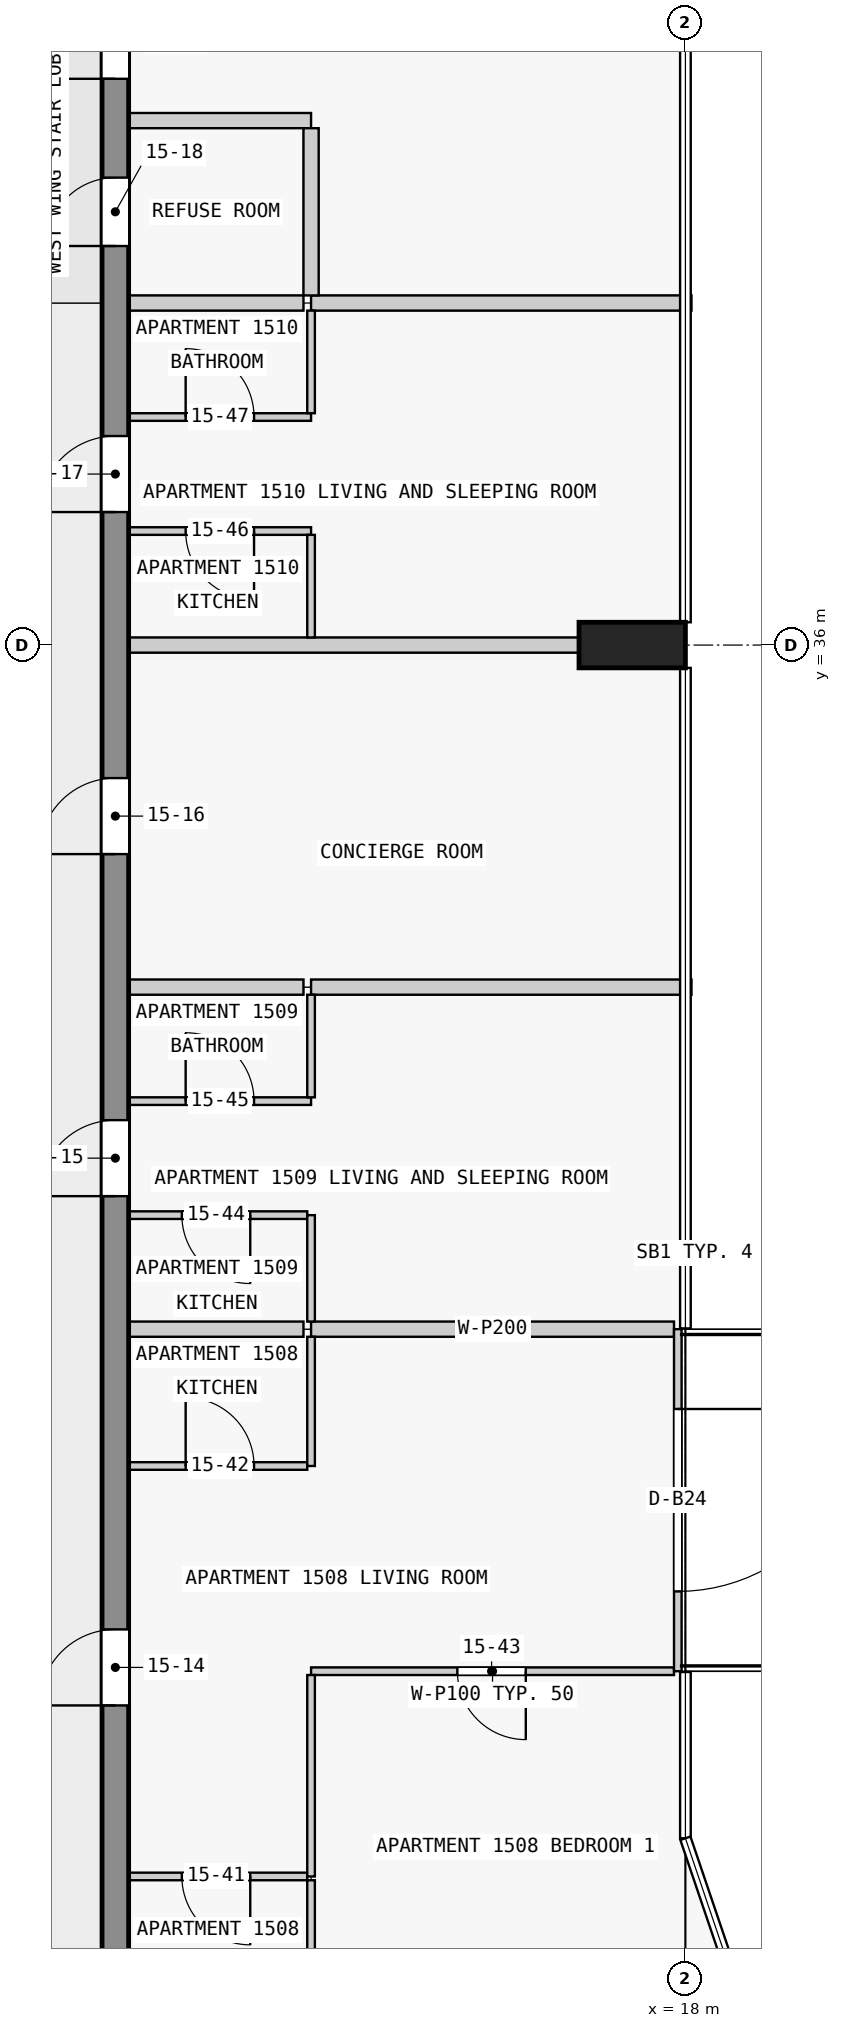
"""IFC4 building model, lengths in metres.
Left out: names, types, materials, properties, quantities, classifications, styles, units other than length and angle.
Written with IfcOpenShell. Run it as: python <this file> out.ifc"""

import sys

from ifc_helpers import new_model, si_unit, direction, frame, frame_2d, origin, origin_2d, place, context, subcontext, project, spatial, rectangle, extrude, element, fill, save


model = new_model("IFC4")
c1 = context("Model", 3, precision=1e-05, world=origin(), true_north=direction((0.0, 1.0)))
c2 = subcontext(c1, "Body", "Model", "MODEL_VIEW")
j1 = project(units=[si_unit("LENGTHUNIT", "METRE"), si_unit("PLANEANGLEUNIT", "RADIAN")], contexts=[c1])
p1 = place(None, origin())
s1 = spatial("IfcSite", under=j1, at=p1, CompositionType="ELEMENT")
p2 = place(p1, origin())
s2 = spatial("IfcBuilding", under=s1, at=p2, CompositionType="ELEMENT")
p3 = place(p2, frame((0.0, 0.0, 61.8)))
s3 = spatial("IfcBuildingStorey", under=s2, at=p3, CompositionType="ELEMENT", Elevation=61.8)
p4 = place(p3, frame((17.3, 36.0, 0.0), z_axis=(0.0, 0.0, 1.0), x_axis=(0.0, 1.0, 0.0)))
e1 = element("IfcColumn", 1, at=p4, inside=s3, PredefinedType="COLUMN", context=c2, shape_type="SweptSolid", body=[
    extrude(rectangle(XDim=0.6, YDim=1.4, at=origin_2d()), origin(), (0.0, 0.0, 1.0), 3.5),
])
p5 = place(p3, frame((10.5, 18.0, 0.0), z_axis=(0.0, 0.0, 1.0), x_axis=(0.0, 1.0, 0.0)))
e2 = element("IfcWall", 2, at=p5, inside=s3, PredefinedType="SHEAR", context=c2, shape_type="SweptSolid", body=[
    extrude(rectangle(XDim=27.0, YDim=0.35, at=frame_2d((13.5, 0.0))), origin(), (0.0, 0.0, 1.0), 3.25),
])
p6 = place(p5, frame((4.05, 0.0, 0.0)))
e3 = element("IfcOpeningElement", 3, at=p6, cuts=e2, PredefinedType="OPENING", context=c2, shape_type="SweptSolid", body=[
    extrude(rectangle(XDim=1.0, YDim=2.1, at=frame_2d((0.5, 1.05))), frame((0.0, 0.185, 0.0), z_axis=(0.0, -1.0, 0.0), x_axis=(1.0, 0.0, 0.0)), (0.0, 0.0, 1.0), 0.37),
])
p7 = place(p5, frame((10.75, 0.0, 0.0)))
e4 = element("IfcOpeningElement", 4, at=p7, cuts=e2, PredefinedType="OPENING", context=c2, shape_type="SweptSolid", body=[
    extrude(rectangle(XDim=1.0, YDim=2.1, at=frame_2d((0.5, 1.05))), frame((0.0, 0.185, 0.0), z_axis=(0.0, -1.0, 0.0), x_axis=(1.0, 0.0, 0.0)), (0.0, 0.0, 1.0), 0.37),
])
p8 = place(p5, frame((15.25, 0.0, 0.0)))
e5 = element("IfcOpeningElement", 5, at=p8, cuts=e2, PredefinedType="OPENING", context=c2, shape_type="SweptSolid", body=[
    extrude(rectangle(XDim=1.0, YDim=2.1, at=frame_2d((0.5, 1.05))), frame((0.0, 0.185, 0.0), z_axis=(0.0, -1.0, 0.0), x_axis=(1.0, 0.0, 0.0)), (0.0, 0.0, 1.0), 0.37),
])
p9 = place(p5, frame((19.75, 0.0, 0.0)))
e6 = element("IfcOpeningElement", 6, at=p9, cuts=e2, PredefinedType="OPENING", context=c2, shape_type="SweptSolid", body=[
    extrude(rectangle(XDim=1.0, YDim=2.1, at=frame_2d((0.5, 1.05))), frame((0.0, 0.185, 0.0), z_axis=(0.0, -1.0, 0.0), x_axis=(1.0, 0.0, 0.0)), (0.0, 0.0, 1.0), 0.37),
])
p10 = place(p5, frame((23.25, 0.0, 0.0)))
e7 = element("IfcOpeningElement", 7, at=p10, cuts=e2, PredefinedType="OPENING", context=c2, shape_type="SweptSolid", body=[
    extrude(rectangle(XDim=0.9, YDim=2.1, at=frame_2d((0.45, 1.05))), frame((0.0, 0.185, 0.0), z_axis=(0.0, -1.0, 0.0), x_axis=(1.0, 0.0, 0.0)), (0.0, 0.0, 1.0), 0.37),
])
p11 = place(p5, frame((25.45, 0.0, 0.0)))
e8 = element("IfcOpeningElement", 8, at=p11, cuts=e2, PredefinedType="OPENING", context=c2, shape_type="SweptSolid", body=[
    extrude(rectangle(XDim=1.0, YDim=2.1, at=frame_2d((0.5, 1.05))), frame((0.0, 0.185, 0.0), z_axis=(0.0, -1.0, 0.0), x_axis=(1.0, 0.0, 0.0)), (0.0, 0.0, 1.0), 0.37),
])
p12 = place(p3, frame((17.9, 27.0, 0.0), z_axis=(0.0, 0.0, 1.0), x_axis=(0.0, -1.0, 0.0)))
e9 = element("IfcWall", 9, at=p12, inside=s3, PredefinedType="STANDARD", context=c2, shape_type="SweptSolid", body=[
    extrude(rectangle(XDim=4.5, YDim=0.1, at=frame_2d((2.25, 0.0))), origin(), (0.0, 0.0, 1.0), 3.25),
])
p13 = place(p12, frame((1.05, 0.0, 0.0)))
e10 = element("IfcOpeningElement", 10, at=p13, cuts=e9, PredefinedType="OPENING", context=c2, shape_type="SweptSolid", body=[
    extrude(rectangle(XDim=2.4, YDim=2.4, at=frame_2d((1.2, 1.2))), frame((0.0, 0.06, 0.0), z_axis=(0.0, -1.0, 0.0), x_axis=(1.0, 0.0, 0.0)), (0.0, 0.0, 1.0), 0.12),
])
p14 = place(p3, frame((13.025, 19.8, 0.0), z_axis=(0.0, 0.0, 1.0), x_axis=(-1.0, 0.0, 0.0)))
e11 = element("IfcWall", 11, at=p14, inside=s3, PredefinedType="PARTITIONING", context=c2, shape_type="SweptSolid", body=[
    extrude(rectangle(XDim=2.35, YDim=0.1, at=frame_2d((1.175, 0.0))), origin(), (0.0, 0.0, 1.0), 3.25),
])
p15 = place(p14, frame((0.75, 0.0, 0.0)))
e12 = element("IfcOpeningElement", 12, at=p15, cuts=e11, PredefinedType="OPENING", context=c2, shape_type="SweptSolid", body=[
    extrude(rectangle(XDim=0.9, YDim=2.1, at=frame_2d((0.45, 1.05))), frame((0.0, 0.06, 0.0), z_axis=(0.0, -1.0, 0.0), x_axis=(1.0, 0.0, 0.0)), (0.0, 0.0, 1.0), 0.12),
])
p16 = place(p3, frame((17.85, 22.5, 0.0), z_axis=(0.0, 0.0, 1.0), x_axis=(-1.0, 0.0, 0.0)))
e13 = element("IfcWall", 13, at=p16, inside=s3, PredefinedType="PARTITIONING", context=c2, shape_type="SweptSolid", body=[
    extrude(rectangle(XDim=4.775, YDim=0.1, at=frame_2d((2.388, 0.0))), origin(), (0.0, 0.0, 1.0), 3.25),
])
p17 = place(p16, frame((1.95, 0.0, 0.0)))
e14 = element("IfcOpeningElement", 14, at=p17, cuts=e13, PredefinedType="OPENING", context=c2, shape_type="SweptSolid", body=[
    extrude(rectangle(XDim=0.9, YDim=2.1, at=frame_2d((0.45, 1.05))), frame((0.0, 0.06, 0.0), z_axis=(0.0, -1.0, 0.0), x_axis=(1.0, 0.0, 0.0)), (0.0, 0.0, 1.0), 0.12),
])
p18 = place(p3, frame((10.675, 25.2, 0.0), z_axis=(0.0, 0.0, 1.0), x_axis=(1.0, 0.0, 0.0)))
e15 = element("IfcWall", 15, at=p18, inside=s3, PredefinedType="PARTITIONING", context=c2, shape_type="SweptSolid", body=[
    extrude(rectangle(XDim=2.35, YDim=0.1, at=frame_2d((1.175, 0.0))), origin(), (0.0, 0.0, 1.0), 3.25),
])
p19 = place(p18, frame((0.75, 0.0, 0.0)))
e16 = element("IfcOpeningElement", 16, at=p19, cuts=e15, PredefinedType="OPENING", context=c2, shape_type="SweptSolid", body=[
    extrude(rectangle(XDim=0.9, YDim=2.1, at=frame_2d((0.45, 1.05))), frame((0.0, 0.06, 0.0), z_axis=(0.0, -1.0, 0.0), x_axis=(1.0, 0.0, 0.0)), (0.0, 0.0, 1.0), 0.12),
])
p20 = place(p3, frame((12.975, 27.0, 0.0), z_axis=(0.0, 0.0, 1.0), x_axis=(-1.0, 0.0, 0.0)))
e17 = element("IfcWall", 17, at=p20, inside=s3, PredefinedType="PARTITIONING", context=c2, shape_type="SweptSolid", body=[
    extrude(rectangle(XDim=2.3, YDim=0.2, at=frame_2d((1.15, 0.0))), origin(), (0.0, 0.0, 1.0), 3.25),
])
p21 = place(p3, frame((13.075, 27.0, 0.0), z_axis=(0.0, 0.0, 1.0), x_axis=(1.0, 0.0, 0.0)))
e18 = element("IfcWall", 18, at=p21, inside=s3, PredefinedType="PARTITIONING", context=c2, shape_type="SweptSolid", body=[
    extrude(rectangle(XDim=4.775, YDim=0.2, at=frame_2d((2.388, 0.0))), origin(), (0.0, 0.0, 1.0), 3.25),
])
p22 = place(p3, frame((13.025, 28.5, 0.0), z_axis=(0.0, 0.0, 1.0), x_axis=(-1.0, 0.0, 0.0)))
e19 = element("IfcWall", 19, at=p22, inside=s3, PredefinedType="PARTITIONING", context=c2, shape_type="SweptSolid", body=[
    extrude(rectangle(XDim=2.35, YDim=0.1, at=frame_2d((1.175, 0.0))), origin(), (0.0, 0.0, 1.0), 3.25),
])
p23 = place(p22, frame((0.75, 0.0, 0.0)))
e20 = element("IfcOpeningElement", 20, at=p23, cuts=e19, PredefinedType="OPENING", context=c2, shape_type="SweptSolid", body=[
    extrude(rectangle(XDim=0.9, YDim=2.1, at=frame_2d((0.45, 1.05))), frame((0.0, 0.06, 0.0), z_axis=(0.0, -1.0, 0.0), x_axis=(1.0, 0.0, 0.0)), (0.0, 0.0, 1.0), 0.12),
])
p24 = place(p3, frame((10.675, 30.0, 0.0), z_axis=(0.0, 0.0, 1.0), x_axis=(1.0, 0.0, 0.0)))
e21 = element("IfcWall", 21, at=p24, inside=s3, PredefinedType="PARTITIONING", context=c2, shape_type="SweptSolid", body=[
    extrude(rectangle(XDim=2.4, YDim=0.1, at=frame_2d((1.2, 0.0))), origin(), (0.0, 0.0, 1.0), 3.25),
])
p25 = place(p24, frame((0.75, 0.0, 0.0)))
e22 = element("IfcOpeningElement", 22, at=p25, cuts=e21, PredefinedType="OPENING", context=c2, shape_type="SweptSolid", body=[
    extrude(rectangle(XDim=0.9, YDim=2.1, at=frame_2d((0.45, 1.05))), frame((0.0, 0.06, 0.0), z_axis=(0.0, -1.0, 0.0), x_axis=(1.0, 0.0, 0.0)), (0.0, 0.0, 1.0), 0.12),
])
p26 = place(p3, frame((12.975, 31.5, 0.0), z_axis=(0.0, 0.0, 1.0), x_axis=(-1.0, 0.0, 0.0)))
e23 = element("IfcWall", 23, at=p26, inside=s3, PredefinedType="PARTITIONING", context=c2, shape_type="SweptSolid", body=[
    extrude(rectangle(XDim=2.3, YDim=0.2, at=frame_2d((1.15, 0.0))), origin(), (0.0, 0.0, 1.0), 3.25),
])
p27 = place(p3, frame((13.075, 31.5, 0.0), z_axis=(0.0, 0.0, 1.0), x_axis=(1.0, 0.0, 0.0)))
e24 = element("IfcWall", 24, at=p27, inside=s3, PredefinedType="PARTITIONING", context=c2, shape_type="SweptSolid", body=[
    extrude(rectangle(XDim=5.005, YDim=0.2, at=frame_2d((2.502, 0.0))), origin(), (0.0, 0.0, 1.0), 3.25),
])
p28 = place(p3, frame((16.6, 36.0, 0.0), z_axis=(0.0, 0.0, 1.0), x_axis=(-1.0, 0.0, 0.0)))
e25 = element("IfcWall", 25, at=p28, inside=s3, PredefinedType="PARTITIONING", context=c2, shape_type="SweptSolid", body=[
    extrude(rectangle(XDim=5.925, YDim=0.2, at=frame_2d((2.962, 0.0))), origin(), (0.0, 0.0, 1.0), 3.25),
])
p29 = place(p3, frame((13.075, 37.5, 0.0), z_axis=(0.0, 0.0, 1.0), x_axis=(-1.0, 0.0, 0.0)))
e26 = element("IfcWall", 26, at=p29, inside=s3, PredefinedType="PARTITIONING", context=c2, shape_type="SweptSolid", body=[
    extrude(rectangle(XDim=2.4, YDim=0.1, at=frame_2d((1.2, 0.0))), origin(), (0.0, 0.0, 1.0), 3.25),
])
p30 = place(p29, frame((0.75, 0.0, 0.0)))
e27 = element("IfcOpeningElement", 27, at=p30, cuts=e26, PredefinedType="OPENING", context=c2, shape_type="SweptSolid", body=[
    extrude(rectangle(XDim=0.9, YDim=2.1, at=frame_2d((0.45, 1.05))), frame((0.0, 0.06, 0.0), z_axis=(0.0, -1.0, 0.0), x_axis=(1.0, 0.0, 0.0)), (0.0, 0.0, 1.0), 0.12),
])
p31 = place(p3, frame((10.675, 39.0, 0.0), z_axis=(0.0, 0.0, 1.0), x_axis=(1.0, 0.0, 0.0)))
e28 = element("IfcWall", 28, at=p31, inside=s3, PredefinedType="PARTITIONING", context=c2, shape_type="SweptSolid", body=[
    extrude(rectangle(XDim=2.4, YDim=0.1, at=frame_2d((1.2, 0.0))), origin(), (0.0, 0.0, 1.0), 3.25),
])
p32 = place(p31, frame((0.75, 0.0, 0.0)))
e29 = element("IfcOpeningElement", 29, at=p32, cuts=e28, PredefinedType="OPENING", context=c2, shape_type="SweptSolid", body=[
    extrude(rectangle(XDim=0.9, YDim=2.1, at=frame_2d((0.45, 1.05))), frame((0.0, 0.06, 0.0), z_axis=(0.0, -1.0, 0.0), x_axis=(1.0, 0.0, 0.0)), (0.0, 0.0, 1.0), 0.12),
])
p33 = place(p3, frame((12.975, 40.5, 0.0), z_axis=(0.0, 0.0, 1.0), x_axis=(-1.0, 0.0, 0.0)))
e30 = element("IfcWall", 30, at=p33, inside=s3, PredefinedType="PARTITIONING", context=c2, shape_type="SweptSolid", body=[
    extrude(rectangle(XDim=2.3, YDim=0.2, at=frame_2d((1.15, 0.0))), origin(), (0.0, 0.0, 1.0), 3.25),
])
p34 = place(p3, frame((13.075, 40.5, 0.0), z_axis=(0.0, 0.0, 1.0), x_axis=(1.0, 0.0, 0.0)))
e31 = element("IfcWall", 31, at=p34, inside=s3, PredefinedType="PARTITIONING", context=c2, shape_type="SweptSolid", body=[
    extrude(rectangle(XDim=5.005, YDim=0.2, at=frame_2d((2.502, 0.0))), origin(), (0.0, 0.0, 1.0), 3.25),
])
p35 = place(p3, frame((13.075, 42.9, 0.0), z_axis=(0.0, 0.0, 1.0), x_axis=(-1.0, 0.0, 0.0)))
e32 = element("IfcWall", 32, at=p35, inside=s3, PredefinedType="PARTITIONING", context=c2, shape_type="SweptSolid", body=[
    extrude(rectangle(XDim=2.4, YDim=0.2, at=frame_2d((1.2, 0.0))), origin(), (0.0, 0.0, 1.0), 3.25),
])
p36 = place(p3, frame((13.075, 22.45, 0.0), z_axis=(0.0, 0.0, 1.0), x_axis=(0.0, -1.0, 0.0)))
e33 = element("IfcWall", 33, at=p36, inside=s3, PredefinedType="PARTITIONING", context=c2, shape_type="SweptSolid", body=[
    extrude(rectangle(XDim=2.65, YDim=0.1, at=frame_2d((1.325, 0.0))), origin(), (0.0, 0.0, 1.0), 3.25),
])
p37 = place(p3, frame((13.075, 18.0, 0.0), z_axis=(0.0, 0.0, 1.0), x_axis=(0.0, 1.0, 0.0)))
e34 = element("IfcWall", 34, at=p37, inside=s3, PredefinedType="PARTITIONING", context=c2, shape_type="SweptSolid", body=[
    extrude(rectangle(XDim=1.75, YDim=0.1, at=frame_2d((0.875, 0.0))), origin(), (0.0, 0.0, 1.0), 3.25),
])
p38 = place(p3, frame((13.075, 25.2, 0.0), z_axis=(0.0, 0.0, 1.0), x_axis=(0.0, 1.0, 0.0)))
e35 = element("IfcWall", 35, at=p38, inside=s3, PredefinedType="PARTITIONING", context=c2, shape_type="SweptSolid", body=[
    extrude(rectangle(XDim=1.7, YDim=0.1, at=frame_2d((0.85, 0.0))), origin(), (0.0, 0.0, 1.0), 3.25),
])
p39 = place(p3, frame((13.075, 27.1, 0.0), z_axis=(0.0, 0.0, 1.0), x_axis=(0.0, 1.0, 0.0)))
e36 = element("IfcWall", 36, at=p39, inside=s3, PredefinedType="PARTITIONING", context=c2, shape_type="SweptSolid", body=[
    extrude(rectangle(XDim=1.4, YDim=0.1, at=frame_2d((0.7, 0.0))), origin(), (0.0, 0.0, 1.0), 3.25),
])
for number, where, z_axis, x_axis in (
    (37, (13.075, 30.05, 0.0), (0.0, 0.0, 1.0), (0.0, 1.0, 0.0)),
    (38, (13.075, 36.1, 0.0), (0.0, 0.0, 1.0), (0.0, 1.0, 0.0)),
    (39, (13.075, 39.05, 0.0), (0.0, 0.0, 1.0), (0.0, 1.0, 0.0)),
):
    element("IfcWall", number, at=place(p3, frame(where, z_axis=z_axis, x_axis=x_axis)), inside=s3, PredefinedType="PARTITIONING", context=c2, shape_type="SweptSolid", body=[
        extrude(rectangle(XDim=1.35, YDim=0.1, at=frame_2d((0.675, 0.0))), origin(), (0.0, 0.0, 1.0), 3.25),
    ])
p40 = place(p3, frame((13.075, 40.6, 0.0), z_axis=(0.0, 0.0, 1.0), x_axis=(0.0, 1.0, 0.0)))
e40 = element("IfcWall", 40, at=p40, inside=s3, PredefinedType="PARTITIONING", context=c2, shape_type="SweptSolid", body=[
    extrude(rectangle(XDim=2.2, YDim=0.2, at=frame_2d((1.1, 0.0))), origin(), (0.0, 0.0, 1.0), 3.25),
])
p41 = place(p13, origin())
e41 = element("IfcDoor", 41, at=p41, inside=s3, OperationType="SINGLE_SWING_LEFT", PredefinedType="DOOR", context=c2, shape_type="SweptSolid", body=[
    extrude(rectangle(XDim=2.4, YDim=2.4, at=frame_2d((1.2, 1.2))), frame((0.0, 0.025, 0.0), z_axis=(0.0, -1.0, 0.0), x_axis=(1.0, 0.0, 0.0)), (0.0, 0.0, 1.0), 0.05),
])
fill(e10, e41)
p42 = place(p6, origin())
e42 = element("IfcDoor", 42, at=p42, inside=s3, OperationType="SINGLE_SWING_LEFT", PredefinedType="DOOR", context=c2, shape_type="SweptSolid", body=[
    extrude(rectangle(XDim=1.0, YDim=2.1, at=frame_2d((0.5, 1.05))), frame((0.0, 0.025, 0.0), z_axis=(0.0, -1.0, 0.0), x_axis=(1.0, 0.0, 0.0)), (0.0, 0.0, 1.0), 0.05),
])
fill(e3, e42)
p43 = place(p7, origin())
e43 = element("IfcDoor", 43, at=p43, inside=s3, OperationType="SINGLE_SWING_LEFT", PredefinedType="DOOR", context=c2, shape_type="SweptSolid", body=[
    extrude(rectangle(XDim=1.0, YDim=2.1, at=frame_2d((0.5, 1.05))), frame((0.0, 0.025, 0.0), z_axis=(0.0, -1.0, 0.0), x_axis=(1.0, 0.0, 0.0)), (0.0, 0.0, 1.0), 0.05),
])
fill(e4, e43)
p44 = place(p8, origin())
e44 = element("IfcDoor", 44, at=p44, inside=s3, OperationType="SINGLE_SWING_RIGHT", PredefinedType="DOOR", context=c2, shape_type="SweptSolid", body=[
    extrude(rectangle(XDim=1.0, YDim=2.1, at=frame_2d((0.5, 1.05))), frame((0.0, 0.025, 0.0), z_axis=(0.0, -1.0, 0.0), x_axis=(1.0, 0.0, 0.0)), (0.0, 0.0, 1.0), 0.05),
])
fill(e5, e44)
p45 = place(p9, origin())
e45 = element("IfcDoor", 45, at=p45, inside=s3, OperationType="SINGLE_SWING_RIGHT", PredefinedType="DOOR", context=c2, shape_type="SweptSolid", body=[
    extrude(rectangle(XDim=1.0, YDim=2.1, at=frame_2d((0.5, 1.05))), frame((0.0, 0.025, 0.0), z_axis=(0.0, -1.0, 0.0), x_axis=(1.0, 0.0, 0.0)), (0.0, 0.0, 1.0), 0.05),
])
fill(e6, e45)
p46 = place(p10, origin())
e46 = element("IfcDoor", 46, at=p46, inside=s3, OperationType="SINGLE_SWING_RIGHT", PredefinedType="DOOR", context=c2, shape_type="SweptSolid", body=[
    extrude(rectangle(XDim=0.9, YDim=2.1, at=frame_2d((0.45, 1.05))), frame((0.0, 0.025, 0.0), z_axis=(0.0, -1.0, 0.0), x_axis=(1.0, 0.0, 0.0)), (0.0, 0.0, 1.0), 0.05),
])
fill(e7, e46)
p47 = place(p11, origin())
e47 = element("IfcDoor", 47, at=p47, inside=s3, OperationType="SINGLE_SWING_RIGHT", PredefinedType="DOOR", context=c2, shape_type="SweptSolid", body=[
    extrude(rectangle(XDim=1.0, YDim=2.1, at=frame_2d((0.5, 1.05))), frame((0.0, 0.025, 0.0), z_axis=(0.0, -1.0, 0.0), x_axis=(1.0, 0.0, 0.0)), (0.0, 0.0, 1.0), 0.05),
])
fill(e8, e47)
p48 = place(p15, origin())
e48 = element("IfcDoor", 48, at=p48, inside=s3, OperationType="SINGLE_SWING_RIGHT", PredefinedType="DOOR", context=c2, shape_type="SweptSolid", body=[
    extrude(rectangle(XDim=0.9, YDim=2.1, at=frame_2d((0.45, 1.05))), frame((0.0, 0.025, 0.0), z_axis=(0.0, -1.0, 0.0), x_axis=(1.0, 0.0, 0.0)), (0.0, 0.0, 1.0), 0.05),
])
fill(e12, e48)
p49 = place(p19, origin())
e49 = element("IfcDoor", 49, at=p49, inside=s3, OperationType="SINGLE_SWING_RIGHT", PredefinedType="DOOR", context=c2, shape_type="SweptSolid", body=[
    extrude(rectangle(XDim=0.9, YDim=2.1, at=frame_2d((0.45, 1.05))), frame((0.0, 0.025, 0.0), z_axis=(0.0, -1.0, 0.0), x_axis=(1.0, 0.0, 0.0)), (0.0, 0.0, 1.0), 0.05),
])
fill(e16, e49)
p50 = place(p17, origin())
e50 = element("IfcDoor", 50, at=p50, inside=s3, OperationType="SINGLE_SWING_RIGHT", PredefinedType="DOOR", context=c2, shape_type="SweptSolid", body=[
    extrude(rectangle(XDim=0.9, YDim=2.1, at=frame_2d((0.45, 1.05))), frame((0.0, 0.025, 0.0), z_axis=(0.0, -1.0, 0.0), x_axis=(1.0, 0.0, 0.0)), (0.0, 0.0, 1.0), 0.05),
])
fill(e14, e50)
p51 = place(p23, origin())
e51 = element("IfcDoor", 51, at=p51, inside=s3, OperationType="SINGLE_SWING_RIGHT", PredefinedType="DOOR", context=c2, shape_type="SweptSolid", body=[
    extrude(rectangle(XDim=0.9, YDim=2.1, at=frame_2d((0.45, 1.05))), frame((0.0, 0.025, 0.0), z_axis=(0.0, -1.0, 0.0), x_axis=(1.0, 0.0, 0.0)), (0.0, 0.0, 1.0), 0.05),
])
fill(e20, e51)
p52 = place(p25, origin())
e52 = element("IfcDoor", 52, at=p52, inside=s3, OperationType="SINGLE_SWING_RIGHT", PredefinedType="DOOR", context=c2, shape_type="SweptSolid", body=[
    extrude(rectangle(XDim=0.9, YDim=2.1, at=frame_2d((0.45, 1.05))), frame((0.0, 0.025, 0.0), z_axis=(0.0, -1.0, 0.0), x_axis=(1.0, 0.0, 0.0)), (0.0, 0.0, 1.0), 0.05),
])
fill(e22, e52)
p53 = place(p30, origin())
e53 = element("IfcDoor", 53, at=p53, inside=s3, OperationType="SINGLE_SWING_RIGHT", PredefinedType="DOOR", context=c2, shape_type="SweptSolid", body=[
    extrude(rectangle(XDim=0.9, YDim=2.1, at=frame_2d((0.45, 1.05))), frame((0.0, 0.025, 0.0), z_axis=(0.0, -1.0, 0.0), x_axis=(1.0, 0.0, 0.0)), (0.0, 0.0, 1.0), 0.05),
])
fill(e27, e53)
p54 = place(p32, origin())
e54 = element("IfcDoor", 54, at=p54, inside=s3, OperationType="SINGLE_SWING_RIGHT", PredefinedType="DOOR", context=c2, shape_type="SweptSolid", body=[
    extrude(rectangle(XDim=0.9, YDim=2.1, at=frame_2d((0.45, 1.05))), frame((0.0, 0.025, 0.0), z_axis=(0.0, -1.0, 0.0), x_axis=(1.0, 0.0, 0.0)), (0.0, 0.0, 1.0), 0.05),
])
fill(e29, e54)
save(model, sys.argv[1])
